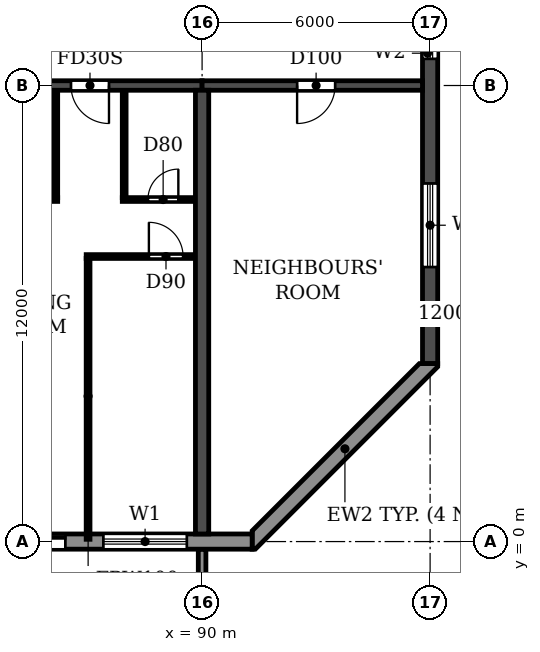
"""IFC4 building model, lengths in metres.
Left out: names, types, materials, properties, quantities, classifications, styles, units other than length and angle.
Written with IfcOpenShell. Run it as: python <this file> out.ifc"""

import sys

from ifc_helpers import new_model, si_unit, direction, frame, frame_2d, origin, place, context, subcontext, project, spatial, polyline, rectangle, outline, extrude, source, transform, mapped, element, fill, save


model = new_model("IFC4")
c1 = context("Model", 3, precision=1e-05, world=origin(), true_north=direction((0.0, 1.0)))
c2 = subcontext(c1, "Body", "Model", "MODEL_VIEW")
j1 = project(units=[si_unit("LENGTHUNIT", "METRE"), si_unit("PLANEANGLEUNIT", "RADIAN")], contexts=[c1])
p1 = place(None, origin())
s1 = spatial("IfcSite", under=j1, at=p1, CompositionType="ELEMENT")
p2 = place(p1, origin())
s2 = spatial("IfcBuilding", under=s1, at=p2, CompositionType="ELEMENT")
p3 = place(p2, frame((0.0, 0.0, 76.2)))
s3 = spatial("IfcBuildingStorey", under=s2, at=p3, CompositionType="ELEMENT", Elevation=76.2)
p4 = place(p3, frame((90.0, 0.2, 0.0), z_axis=(0.0, 0.0, 1.0), x_axis=(0.0, 1.0, 0.0)))
e1 = element("IfcWall", 1, at=p4, inside=s3, PredefinedType="SHEAR", context=c2, shape_type="SweptSolid", body=[
    extrude(rectangle(XDim=11.675, YDim=0.35, at=frame_2d((5.837, 0.0))), origin(), (0.0, 0.0, 1.0), 3.06),
])
p5 = place(p3, frame((96.0, 4.683, 0.0), z_axis=(0.0, 0.0, 1.0), x_axis=(0.0, 1.0, 0.0)))
e2 = element("IfcWall", 2, at=p5, inside=s3, PredefinedType="SHEAR", context=c2, shape_type="SweptSolid", body=[
    extrude(rectangle(XDim=34.234, YDim=0.4, at=frame_2d((17.117, 0.0))), origin(), (0.0, 0.0, 1.0), 3.06),
])
p6 = place(p5, frame((15.917, 0.0, 0.9)))
e3 = element("IfcOpeningElement", 3, at=p6, cuts=e2, PredefinedType="OPENING", context=c2, shape_type="SweptSolid", body=[
    extrude(rectangle(XDim=1.2, YDim=1.5, at=frame_2d((0.6, 0.75))), frame((0.0, 0.21, 0.0), z_axis=(0.0, -1.0, 0.0), x_axis=(1.0, 0.0, 0.0)), (0.0, 0.0, 1.0), 0.42),
])
p7 = place(p5, frame((23.817, 0.0, 0.9)))
e4 = element("IfcOpeningElement", 4, at=p7, cuts=e2, PredefinedType="OPENING", context=c2, shape_type="SweptSolid", body=[
    extrude(rectangle(XDim=1.2, YDim=1.5, at=frame_2d((0.6, 0.75))), frame((0.0, 0.21, 0.0), z_axis=(0.0, -1.0, 0.0), x_axis=(1.0, 0.0, 0.0)), (0.0, 0.0, 1.0), 0.42),
])
p8 = place(p5, frame((8.017, 0.0, 0.9)))
e5 = element("IfcOpeningElement", 5, at=p8, cuts=e2, PredefinedType="OPENING", context=c2, shape_type="SweptSolid", body=[
    extrude(rectangle(XDim=1.2, YDim=1.5, at=frame_2d((0.6, 0.75))), frame((0.0, 0.21, 0.0), z_axis=(0.0, -1.0, 0.0), x_axis=(1.0, 0.0, 0.0)), (0.0, 0.0, 1.0), 0.42),
])
p9 = place(p5, frame((28.894, 0.0, 0.6)))
e6 = element("IfcOpeningElement", 6, at=p9, cuts=e2, PredefinedType="OPENING", context=c2, shape_type="SweptSolid", body=[
    extrude(rectangle(XDim=2.2, YDim=1.8, at=frame_2d((1.1, 0.9))), frame((0.0, 0.21, 0.0), z_axis=(0.0, -1.0, 0.0), x_axis=(1.0, 0.0, 0.0)), (0.0, 0.0, 1.0), 0.42),
])
p10 = place(p5, frame((2.541, 0.0, 0.6)))
e7 = element("IfcOpeningElement", 7, at=p10, cuts=e2, PredefinedType="OPENING", context=c2, shape_type="SweptSolid", body=[
    extrude(rectangle(XDim=2.2, YDim=1.8, at=frame_2d((1.1, 0.9))), frame((0.0, 0.21, 0.0), z_axis=(0.0, -1.0, 0.0), x_axis=(1.0, 0.0, 0.0)), (0.0, 0.0, 1.0), 0.42),
])
p11 = place(p3, frame((84.0, 12.0, 0.0), z_axis=(0.0, 0.0, 1.0), x_axis=(1.0, 0.0, 0.0)))
e8 = element("IfcWall", 8, at=p11, inside=s3, PredefinedType="SHEAR", context=c2, shape_type="SweptSolid", body=[
    extrude(rectangle(XDim=6.0, YDim=0.25, at=frame_2d((3.0, 0.0))), origin(), (0.0, 0.0, 1.0), 2.46),
])
p12 = place(p11, frame((2.55, 0.0, 0.0)))
e9 = element("IfcOpeningElement", 9, at=p12, cuts=e8, PredefinedType="OPENING", context=c2, shape_type="SweptSolid", body=[
    extrude(rectangle(XDim=1.0, YDim=2.1, at=frame_2d((0.5, 1.05))), frame((0.0, 0.135, 0.0), z_axis=(0.0, -1.0, 0.0), x_axis=(1.0, 0.0, 0.0)), (0.0, 0.0, 1.0), 0.27),
])
p13 = place(p3, frame((90.0, 12.0, 0.0), z_axis=(0.0, 0.0, 1.0), x_axis=(1.0, 0.0, 0.0)))
e10 = element("IfcWall", 10, at=p13, inside=s3, PredefinedType="SHEAR", context=c2, shape_type="SweptSolid", body=[
    extrude(rectangle(XDim=5.8, YDim=0.25, at=frame_2d((2.9, 0.0))), origin(), (0.0, 0.0, 1.0), 2.46),
])
p14 = place(p13, frame((2.5, 0.0, 0.0)))
e11 = element("IfcOpeningElement", 11, at=p14, cuts=e10, PredefinedType="OPENING", context=c2, shape_type="SweptSolid", body=[
    extrude(rectangle(XDim=1.0, YDim=2.1, at=frame_2d((0.5, 1.05))), frame((0.0, 0.135, 0.0), z_axis=(0.0, -1.0, 0.0), x_axis=(1.0, 0.0, 0.0)), (0.0, 0.0, 1.0), 0.27),
])
p15 = place(p3, frame((10.683, 0.0, 0.0), z_axis=(0.0, 0.0, 1.0), x_axis=(1.0, 0.0, 0.0)))
e12 = element("IfcWall", 12, at=p15, inside=s3, PredefinedType="STANDARD", context=c2, shape_type="SweptSolid", body=[
    extrude(rectangle(XDim=80.634, YDim=0.4, at=frame_2d((40.317, 0.0))), origin(), (0.0, 0.0, 1.0), 3.06),
])
p16 = place(p15, frame((1.717, 0.0, 0.9)))
e13 = element("IfcOpeningElement", 13, at=p16, cuts=e12, PredefinedType="OPENING", context=c2, shape_type="SweptSolid", body=[
    extrude(rectangle(XDim=2.2, YDim=1.5, at=frame_2d((1.1, 0.75))), frame((0.0, 0.21, 0.0), z_axis=(0.0, -1.0, 0.0), x_axis=(1.0, 0.0, 0.0)), (0.0, 0.0, 1.0), 0.42),
])
p17 = place(p15, frame((4.917, 0.0, 0.0)))
e14 = element("IfcOpeningElement", 14, at=p17, cuts=e12, PredefinedType="OPENING", context=c2, shape_type="SweptSolid", body=[
    extrude(rectangle(XDim=1.8, YDim=2.4, at=frame_2d((0.9, 1.2))), frame((0.0, 0.21, 0.0), z_axis=(0.0, -1.0, 0.0), x_axis=(1.0, 0.0, 0.0)), (0.0, 0.0, 1.0), 0.42),
])
p18 = place(p15, frame((7.717, 0.0, 0.9)))
e15 = element("IfcOpeningElement", 15, at=p18, cuts=e12, PredefinedType="OPENING", context=c2, shape_type="SweptSolid", body=[
    extrude(rectangle(XDim=2.2, YDim=1.5, at=frame_2d((1.1, 0.75))), frame((0.0, 0.21, 0.0), z_axis=(0.0, -1.0, 0.0), x_axis=(1.0, 0.0, 0.0)), (0.0, 0.0, 1.0), 0.42),
])
p19 = place(p15, frame((10.717, 0.0, 0.9)))
e16 = element("IfcOpeningElement", 16, at=p19, cuts=e12, PredefinedType="OPENING", context=c2, shape_type="SweptSolid", body=[
    extrude(rectangle(XDim=2.2, YDim=1.5, at=frame_2d((1.1, 0.75))), frame((0.0, 0.21, 0.0), z_axis=(0.0, -1.0, 0.0), x_axis=(1.0, 0.0, 0.0)), (0.0, 0.0, 1.0), 0.42),
])
p20 = place(p15, frame((13.717, 0.0, 0.9)))
e17 = element("IfcOpeningElement", 17, at=p20, cuts=e12, PredefinedType="OPENING", context=c2, shape_type="SweptSolid", body=[
    extrude(rectangle(XDim=2.2, YDim=1.5, at=frame_2d((1.1, 0.75))), frame((0.0, 0.21, 0.0), z_axis=(0.0, -1.0, 0.0), x_axis=(1.0, 0.0, 0.0)), (0.0, 0.0, 1.0), 0.42),
])
p21 = place(p15, frame((16.917, 0.0, 0.0)))
e18 = element("IfcOpeningElement", 18, at=p21, cuts=e12, PredefinedType="OPENING", context=c2, shape_type="SweptSolid", body=[
    extrude(rectangle(XDim=1.8, YDim=2.4, at=frame_2d((0.9, 1.2))), frame((0.0, 0.21, 0.0), z_axis=(0.0, -1.0, 0.0), x_axis=(1.0, 0.0, 0.0)), (0.0, 0.0, 1.0), 0.42),
])
p22 = place(p15, frame((19.717, 0.0, 0.9)))
e19 = element("IfcOpeningElement", 19, at=p22, cuts=e12, PredefinedType="OPENING", context=c2, shape_type="SweptSolid", body=[
    extrude(rectangle(XDim=2.2, YDim=1.5, at=frame_2d((1.1, 0.75))), frame((0.0, 0.21, 0.0), z_axis=(0.0, -1.0, 0.0), x_axis=(1.0, 0.0, 0.0)), (0.0, 0.0, 1.0), 0.42),
])
p23 = place(p15, frame((22.717, 0.0, 0.9)))
e20 = element("IfcOpeningElement", 20, at=p23, cuts=e12, PredefinedType="OPENING", context=c2, shape_type="SweptSolid", body=[
    extrude(rectangle(XDim=2.2, YDim=1.5, at=frame_2d((1.1, 0.75))), frame((0.0, 0.21, 0.0), z_axis=(0.0, -1.0, 0.0), x_axis=(1.0, 0.0, 0.0)), (0.0, 0.0, 1.0), 0.42),
])
p24 = place(p15, frame((25.917, 0.0, 0.0)))
e21 = element("IfcOpeningElement", 21, at=p24, cuts=e12, PredefinedType="OPENING", context=c2, shape_type="SweptSolid", body=[
    extrude(rectangle(XDim=1.8, YDim=2.4, at=frame_2d((0.9, 1.2))), frame((0.0, 0.21, 0.0), z_axis=(0.0, -1.0, 0.0), x_axis=(1.0, 0.0, 0.0)), (0.0, 0.0, 1.0), 0.42),
])
p25 = place(p15, frame((28.717, 0.0, 0.9)))
e22 = element("IfcOpeningElement", 22, at=p25, cuts=e12, PredefinedType="OPENING", context=c2, shape_type="SweptSolid", body=[
    extrude(rectangle(XDim=2.2, YDim=1.5, at=frame_2d((1.1, 0.75))), frame((0.0, 0.21, 0.0), z_axis=(0.0, -1.0, 0.0), x_axis=(1.0, 0.0, 0.0)), (0.0, 0.0, 1.0), 0.42),
])
p26 = place(p15, frame((31.717, 0.0, 0.9)))
e23 = element("IfcOpeningElement", 23, at=p26, cuts=e12, PredefinedType="OPENING", context=c2, shape_type="SweptSolid", body=[
    extrude(rectangle(XDim=2.2, YDim=1.5, at=frame_2d((1.1, 0.75))), frame((0.0, 0.21, 0.0), z_axis=(0.0, -1.0, 0.0), x_axis=(1.0, 0.0, 0.0)), (0.0, 0.0, 1.0), 0.42),
])
p27 = place(p15, frame((34.717, 0.0, 0.9)))
e24 = element("IfcOpeningElement", 24, at=p27, cuts=e12, PredefinedType="OPENING", context=c2, shape_type="SweptSolid", body=[
    extrude(rectangle(XDim=2.2, YDim=1.5, at=frame_2d((1.1, 0.75))), frame((0.0, 0.21, 0.0), z_axis=(0.0, -1.0, 0.0), x_axis=(1.0, 0.0, 0.0)), (0.0, 0.0, 1.0), 0.42),
])
p28 = place(p15, frame((37.917, 0.0, 0.0)))
e25 = element("IfcOpeningElement", 25, at=p28, cuts=e12, PredefinedType="OPENING", context=c2, shape_type="SweptSolid", body=[
    extrude(rectangle(XDim=1.8, YDim=2.4, at=frame_2d((0.9, 1.2))), frame((0.0, 0.21, 0.0), z_axis=(0.0, -1.0, 0.0), x_axis=(1.0, 0.0, 0.0)), (0.0, 0.0, 1.0), 0.42),
])
p29 = place(p15, frame((40.717, 0.0, 0.9)))
e26 = element("IfcOpeningElement", 26, at=p29, cuts=e12, PredefinedType="OPENING", context=c2, shape_type="SweptSolid", body=[
    extrude(rectangle(XDim=2.2, YDim=1.5, at=frame_2d((1.1, 0.75))), frame((0.0, 0.21, 0.0), z_axis=(0.0, -1.0, 0.0), x_axis=(1.0, 0.0, 0.0)), (0.0, 0.0, 1.0), 0.42),
])
p30 = place(p15, frame((43.717, 0.0, 0.9)))
e27 = element("IfcOpeningElement", 27, at=p30, cuts=e12, PredefinedType="OPENING", context=c2, shape_type="SweptSolid", body=[
    extrude(rectangle(XDim=2.2, YDim=1.5, at=frame_2d((1.1, 0.75))), frame((0.0, 0.21, 0.0), z_axis=(0.0, -1.0, 0.0), x_axis=(1.0, 0.0, 0.0)), (0.0, 0.0, 1.0), 0.42),
])
p31 = place(p15, frame((46.717, 0.0, 0.9)))
e28 = element("IfcOpeningElement", 28, at=p31, cuts=e12, PredefinedType="OPENING", context=c2, shape_type="SweptSolid", body=[
    extrude(rectangle(XDim=2.2, YDim=1.5, at=frame_2d((1.1, 0.75))), frame((0.0, 0.21, 0.0), z_axis=(0.0, -1.0, 0.0), x_axis=(1.0, 0.0, 0.0)), (0.0, 0.0, 1.0), 0.42),
])
p32 = place(p15, frame((49.917, 0.0, 0.0)))
e29 = element("IfcOpeningElement", 29, at=p32, cuts=e12, PredefinedType="OPENING", context=c2, shape_type="SweptSolid", body=[
    extrude(rectangle(XDim=1.8, YDim=2.4, at=frame_2d((0.9, 1.2))), frame((0.0, 0.21, 0.0), z_axis=(0.0, -1.0, 0.0), x_axis=(1.0, 0.0, 0.0)), (0.0, 0.0, 1.0), 0.42),
])
p33 = place(p15, frame((52.717, 0.0, 0.9)))
e30 = element("IfcOpeningElement", 30, at=p33, cuts=e12, PredefinedType="OPENING", context=c2, shape_type="SweptSolid", body=[
    extrude(rectangle(XDim=2.2, YDim=1.5, at=frame_2d((1.1, 0.75))), frame((0.0, 0.21, 0.0), z_axis=(0.0, -1.0, 0.0), x_axis=(1.0, 0.0, 0.0)), (0.0, 0.0, 1.0), 0.42),
])
p34 = place(p15, frame((55.717, 0.0, 0.9)))
e31 = element("IfcOpeningElement", 31, at=p34, cuts=e12, PredefinedType="OPENING", context=c2, shape_type="SweptSolid", body=[
    extrude(rectangle(XDim=2.2, YDim=1.5, at=frame_2d((1.1, 0.75))), frame((0.0, 0.21, 0.0), z_axis=(0.0, -1.0, 0.0), x_axis=(1.0, 0.0, 0.0)), (0.0, 0.0, 1.0), 0.42),
])
p35 = place(p15, frame((58.717, 0.0, 0.9)))
e32 = element("IfcOpeningElement", 32, at=p35, cuts=e12, PredefinedType="OPENING", context=c2, shape_type="SweptSolid", body=[
    extrude(rectangle(XDim=2.2, YDim=1.5, at=frame_2d((1.1, 0.75))), frame((0.0, 0.21, 0.0), z_axis=(0.0, -1.0, 0.0), x_axis=(1.0, 0.0, 0.0)), (0.0, 0.0, 1.0), 0.42),
])
p36 = place(p15, frame((61.717, 0.0, 0.9)))
e33 = element("IfcOpeningElement", 33, at=p36, cuts=e12, PredefinedType="OPENING", context=c2, shape_type="SweptSolid", body=[
    extrude(rectangle(XDim=2.2, YDim=1.5, at=frame_2d((1.1, 0.75))), frame((0.0, 0.21, 0.0), z_axis=(0.0, -1.0, 0.0), x_axis=(1.0, 0.0, 0.0)), (0.0, 0.0, 1.0), 0.42),
])
p37 = place(p15, frame((64.917, 0.0, 0.0)))
e34 = element("IfcOpeningElement", 34, at=p37, cuts=e12, PredefinedType="OPENING", context=c2, shape_type="SweptSolid", body=[
    extrude(rectangle(XDim=1.8, YDim=2.4, at=frame_2d((0.9, 1.2))), frame((0.0, 0.21, 0.0), z_axis=(0.0, -1.0, 0.0), x_axis=(1.0, 0.0, 0.0)), (0.0, 0.0, 1.0), 0.42),
])
p38 = place(p15, frame((67.717, 0.0, 0.9)))
e35 = element("IfcOpeningElement", 35, at=p38, cuts=e12, PredefinedType="OPENING", context=c2, shape_type="SweptSolid", body=[
    extrude(rectangle(XDim=2.2, YDim=1.5, at=frame_2d((1.1, 0.75))), frame((0.0, 0.21, 0.0), z_axis=(0.0, -1.0, 0.0), x_axis=(1.0, 0.0, 0.0)), (0.0, 0.0, 1.0), 0.42),
])
p39 = place(p15, frame((70.717, 0.0, 0.9)))
e36 = element("IfcOpeningElement", 36, at=p39, cuts=e12, PredefinedType="OPENING", context=c2, shape_type="SweptSolid", body=[
    extrude(rectangle(XDim=2.2, YDim=1.5, at=frame_2d((1.1, 0.75))), frame((0.0, 0.21, 0.0), z_axis=(0.0, -1.0, 0.0), x_axis=(1.0, 0.0, 0.0)), (0.0, 0.0, 1.0), 0.42),
])
p40 = place(p15, frame((73.917, 0.0, 0.0)))
e37 = element("IfcOpeningElement", 37, at=p40, cuts=e12, PredefinedType="OPENING", context=c2, shape_type="SweptSolid", body=[
    extrude(rectangle(XDim=1.8, YDim=2.4, at=frame_2d((0.9, 1.2))), frame((0.0, 0.21, 0.0), z_axis=(0.0, -1.0, 0.0), x_axis=(1.0, 0.0, 0.0)), (0.0, 0.0, 1.0), 0.42),
])
p41 = place(p15, frame((76.717, 0.0, 0.9)))
e38 = element("IfcOpeningElement", 38, at=p41, cuts=e12, PredefinedType="OPENING", context=c2, shape_type="SweptSolid", body=[
    extrude(rectangle(XDim=2.2, YDim=1.5, at=frame_2d((1.1, 0.75))), frame((0.0, 0.21, 0.0), z_axis=(0.0, -1.0, 0.0), x_axis=(1.0, 0.0, 0.0)), (0.0, 0.0, 1.0), 0.42),
])
p42 = place(p3, origin())
e39 = element("IfcWall", 39, at=p42, inside=s3, PredefinedType="STANDARD", context=c2, shape_type="SweptSolid", body=[
    extrude(outline(polyline([(91.317, -0.2), (91.4, -0.2), (96.2, 4.6), (96.2, 4.683), (95.717, 4.683), (91.317, 0.283), (91.317, -0.2)])), origin(), (0.0, 0.0, 1.0), 3.06),
])
m1 = source(origin(), c2, "Body", "SweptSolid", [
    extrude(outline(polyline([(0.0, 0.0), (0.2, 0.0), (0.2, 1.65), (0.0, 1.65), (0.0, 0.0)])), origin(), (0.0, 0.0, 1.0), 3.1),
])
p43 = place(p3, frame((89.9, -1.85, 0.0)))
e40 = element("IfcWall", 40, at=p43, inside=s3, PredefinedType="STANDARD", context=c2, shape_type="MappedRepresentation", body=[
    mapped(m1, transform((0.0, 0.0, 0.0))),
])
p44 = place(p3, frame((86.95, 7.5, 0.0), z_axis=(0.0, 0.0, 1.0), x_axis=(1.0, 0.0, 0.0)))
e41 = element("IfcWall", 41, at=p44, inside=s3, PredefinedType="PARTITIONING", context=c2, shape_type="SweptSolid", body=[
    extrude(rectangle(XDim=2.865, YDim=0.1, at=frame_2d((1.433, 0.0))), origin(), (0.0, 0.0, 1.0), 3.06),
])
p45 = place(p44, frame((1.65, 0.0, 0.0)))
e42 = element("IfcOpeningElement", 42, at=p45, cuts=e41, PredefinedType="OPENING", context=c2, shape_type="SweptSolid", body=[
    extrude(rectangle(XDim=0.9, YDim=2.1, at=frame_2d((0.45, 1.05))), frame((0.0, 0.06, 0.0), z_axis=(0.0, -1.0, 0.0), x_axis=(1.0, 0.0, 0.0)), (0.0, 0.0, 1.0), 0.12),
])
p46 = place(p3, frame((84.185, 9.0, 0.0), z_axis=(0.0, 0.0, 1.0), x_axis=(1.0, 0.0, 0.0)))
e43 = element("IfcWall", 43, at=p46, inside=s3, PredefinedType="PARTITIONING", context=c2, shape_type="SweptSolid", body=[
    extrude(rectangle(XDim=2.015, YDim=0.1, at=frame_2d((1.007, 0.0))), origin(), (0.0, 0.0, 1.0), 3.06),
])
p47 = place(p46, frame((0.44, 0.0, 0.0)))
e44 = element("IfcOpeningElement", 44, at=p47, cuts=e43, PredefinedType="OPENING", context=c2, shape_type="SweptSolid", body=[
    extrude(rectangle(XDim=0.9, YDim=2.1, at=frame_2d((0.45, 1.05))), frame((0.0, 0.06, 0.0), z_axis=(0.0, -1.0, 0.0), x_axis=(1.0, 0.0, 0.0)), (0.0, 0.0, 1.0), 0.12),
])
p48 = place(p3, frame((87.9, 9.0, 0.0), z_axis=(0.0, 0.0, 1.0), x_axis=(1.0, 0.0, 0.0)))
e45 = element("IfcWall", 45, at=p48, inside=s3, PredefinedType="PARTITIONING", context=c2, shape_type="SweptSolid", body=[
    extrude(rectangle(XDim=1.915, YDim=0.1, at=frame_2d((0.958, 0.0))), origin(), (0.0, 0.0, 1.0), 3.06),
])
p49 = place(p48, frame((0.675, 0.0, 0.0)))
e46 = element("IfcOpeningElement", 46, at=p49, cuts=e45, PredefinedType="OPENING", context=c2, shape_type="SweptSolid", body=[
    extrude(rectangle(XDim=0.8, YDim=2.1, at=frame_2d((0.4, 1.05))), frame((0.0, 0.06, 0.0), z_axis=(0.0, -1.0, 0.0), x_axis=(1.0, 0.0, 0.0)), (0.0, 0.0, 1.0), 0.12),
])
p50 = place(p3, frame((86.15, 9.05, 0.0), z_axis=(0.0, 0.0, 1.0), x_axis=(0.0, 1.0, 0.0)))
e47 = element("IfcWall", 47, at=p50, inside=s3, PredefinedType="PARTITIONING", context=c2, shape_type="SweptSolid", body=[
    extrude(rectangle(XDim=2.815, YDim=0.1, at=frame_2d((1.407, 0.0))), origin(), (0.0, 0.0, 1.0), 3.06),
])
p51 = place(p3, frame((87.0, 0.06, 0.0), z_axis=(0.0, 0.0, 1.0), x_axis=(0.0, 1.0, 0.0)))
e48 = element("IfcWall", 48, at=p51, inside=s3, PredefinedType="PARTITIONING", context=c2, shape_type="SweptSolid", body=[
    extrude(rectangle(XDim=7.39, YDim=0.1, at=frame_2d((3.695, 0.0))), origin(), (0.0, 0.0, 1.0), 3.06),
])
p52 = place(p3, frame((87.95, 9.05, 0.0), z_axis=(0.0, 0.0, 1.0), x_axis=(0.0, 1.0, 0.0)))
e49 = element("IfcWall", 49, at=p52, inside=s3, PredefinedType="PARTITIONING", context=c2, shape_type="SweptSolid", body=[
    extrude(rectangle(XDim=2.815, YDim=0.1, at=frame_2d((1.407, 0.0))), origin(), (0.0, 0.0, 1.0), 3.06),
])
p53 = place(p40, origin())
e50 = element("IfcDoor", 50, at=p53, inside=s3, OperationType="DOUBLE_DOOR_SLIDING", PredefinedType="DOOR", context=c2, shape_type="SweptSolid", body=[
    extrude(rectangle(XDim=1.8, YDim=2.4, at=frame_2d((0.9, 1.2))), frame((0.0, 0.025, 0.0), z_axis=(0.0, -1.0, 0.0), x_axis=(1.0, 0.0, 0.0)), (0.0, 0.0, 1.0), 0.05),
])
fill(e37, e50)
p54 = place(p41, origin())
e51 = element("IfcWindow", 51, at=p54, inside=s3, PartitioningType="DOUBLE_PANEL_HORIZONTAL", PredefinedType="WINDOW", context=c2, shape_type="SweptSolid", body=[
    extrude(rectangle(XDim=2.2, YDim=1.5, at=frame_2d((1.1, 0.75))), frame((0.0, 0.03, 0.0), z_axis=(0.0, -1.0, 0.0), x_axis=(1.0, 0.0, 0.0)), (0.0, 0.0, 1.0), 0.06),
])
fill(e38, e51)
p55 = place(p8, origin())
e52 = element("IfcWindow", 52, at=p55, inside=s3, PartitioningType="SINGLE_PANEL", PredefinedType="WINDOW", context=c2, shape_type="SweptSolid", body=[
    extrude(rectangle(XDim=1.2, YDim=1.5, at=frame_2d((0.6, 0.75))), frame((0.0, 0.03, 0.0), z_axis=(0.0, -1.0, 0.0), x_axis=(1.0, 0.0, 0.0)), (0.0, 0.0, 1.0), 0.06),
])
fill(e5, e52)
p56 = place(p10, origin())
e53 = element("IfcWindow", 53, at=p56, inside=s3, PartitioningType="DOUBLE_PANEL_HORIZONTAL", PredefinedType="WINDOW", context=c2, shape_type="SweptSolid", body=[
    extrude(rectangle(XDim=2.2, YDim=1.8, at=frame_2d((1.1, 0.9))), frame((0.0, 0.03, 0.0), z_axis=(0.0, -1.0, 0.0), x_axis=(1.0, 0.0, 0.0)), (0.0, 0.0, 1.0), 0.06),
])
fill(e7, e53)
p57 = place(p12, frame((1.0, 0.0, 0.0), z_axis=(0.0, 0.0, 1.0), x_axis=(-1.0, 0.0, 0.0)))
e54 = element("IfcDoor", 54, at=p57, inside=s3, OperationType="SINGLE_SWING_LEFT", PredefinedType="DOOR", context=c2, shape_type="SweptSolid", body=[
    extrude(rectangle(XDim=1.0, YDim=2.1, at=frame_2d((0.5, 1.05))), frame((0.0, 0.025, 0.0), z_axis=(0.0, -1.0, 0.0), x_axis=(1.0, 0.0, 0.0)), (0.0, 0.0, 1.0), 0.05),
])
fill(e9, e54)
p58 = place(p49, origin())
e55 = element("IfcDoor", 55, at=p58, inside=s3, OperationType="SINGLE_SWING_RIGHT", PredefinedType="DOOR", context=c2, shape_type="SweptSolid", body=[
    extrude(rectangle(XDim=0.8, YDim=2.1, at=frame_2d((0.4, 1.05))), frame((0.0, 0.025, 0.0), z_axis=(0.0, -1.0, 0.0), x_axis=(1.0, 0.0, 0.0)), (0.0, 0.0, 1.0), 0.05),
])
fill(e46, e55)
p59 = place(p45, origin())
e56 = element("IfcDoor", 56, at=p59, inside=s3, OperationType="SINGLE_SWING_LEFT", PredefinedType="DOOR", context=c2, shape_type="SweptSolid", body=[
    extrude(rectangle(XDim=0.9, YDim=2.1, at=frame_2d((0.45, 1.05))), frame((0.0, 0.025, 0.0), z_axis=(0.0, -1.0, 0.0), x_axis=(1.0, 0.0, 0.0)), (0.0, 0.0, 1.0), 0.05),
])
fill(e42, e56)
p60 = place(p14, frame((1.0, 0.0, 0.0), z_axis=(0.0, 0.0, 1.0), x_axis=(-1.0, 0.0, 0.0)))
e57 = element("IfcDoor", 57, at=p60, inside=s3, OperationType="SINGLE_SWING_RIGHT", PredefinedType="DOOR", context=c2, shape_type="SweptSolid", body=[
    extrude(rectangle(XDim=1.0, YDim=2.1, at=frame_2d((0.5, 1.05))), frame((0.0, 0.025, 0.0), z_axis=(0.0, -1.0, 0.0), x_axis=(1.0, 0.0, 0.0)), (0.0, 0.0, 1.0), 0.05),
])
fill(e11, e57)
save(model, sys.argv[1])
